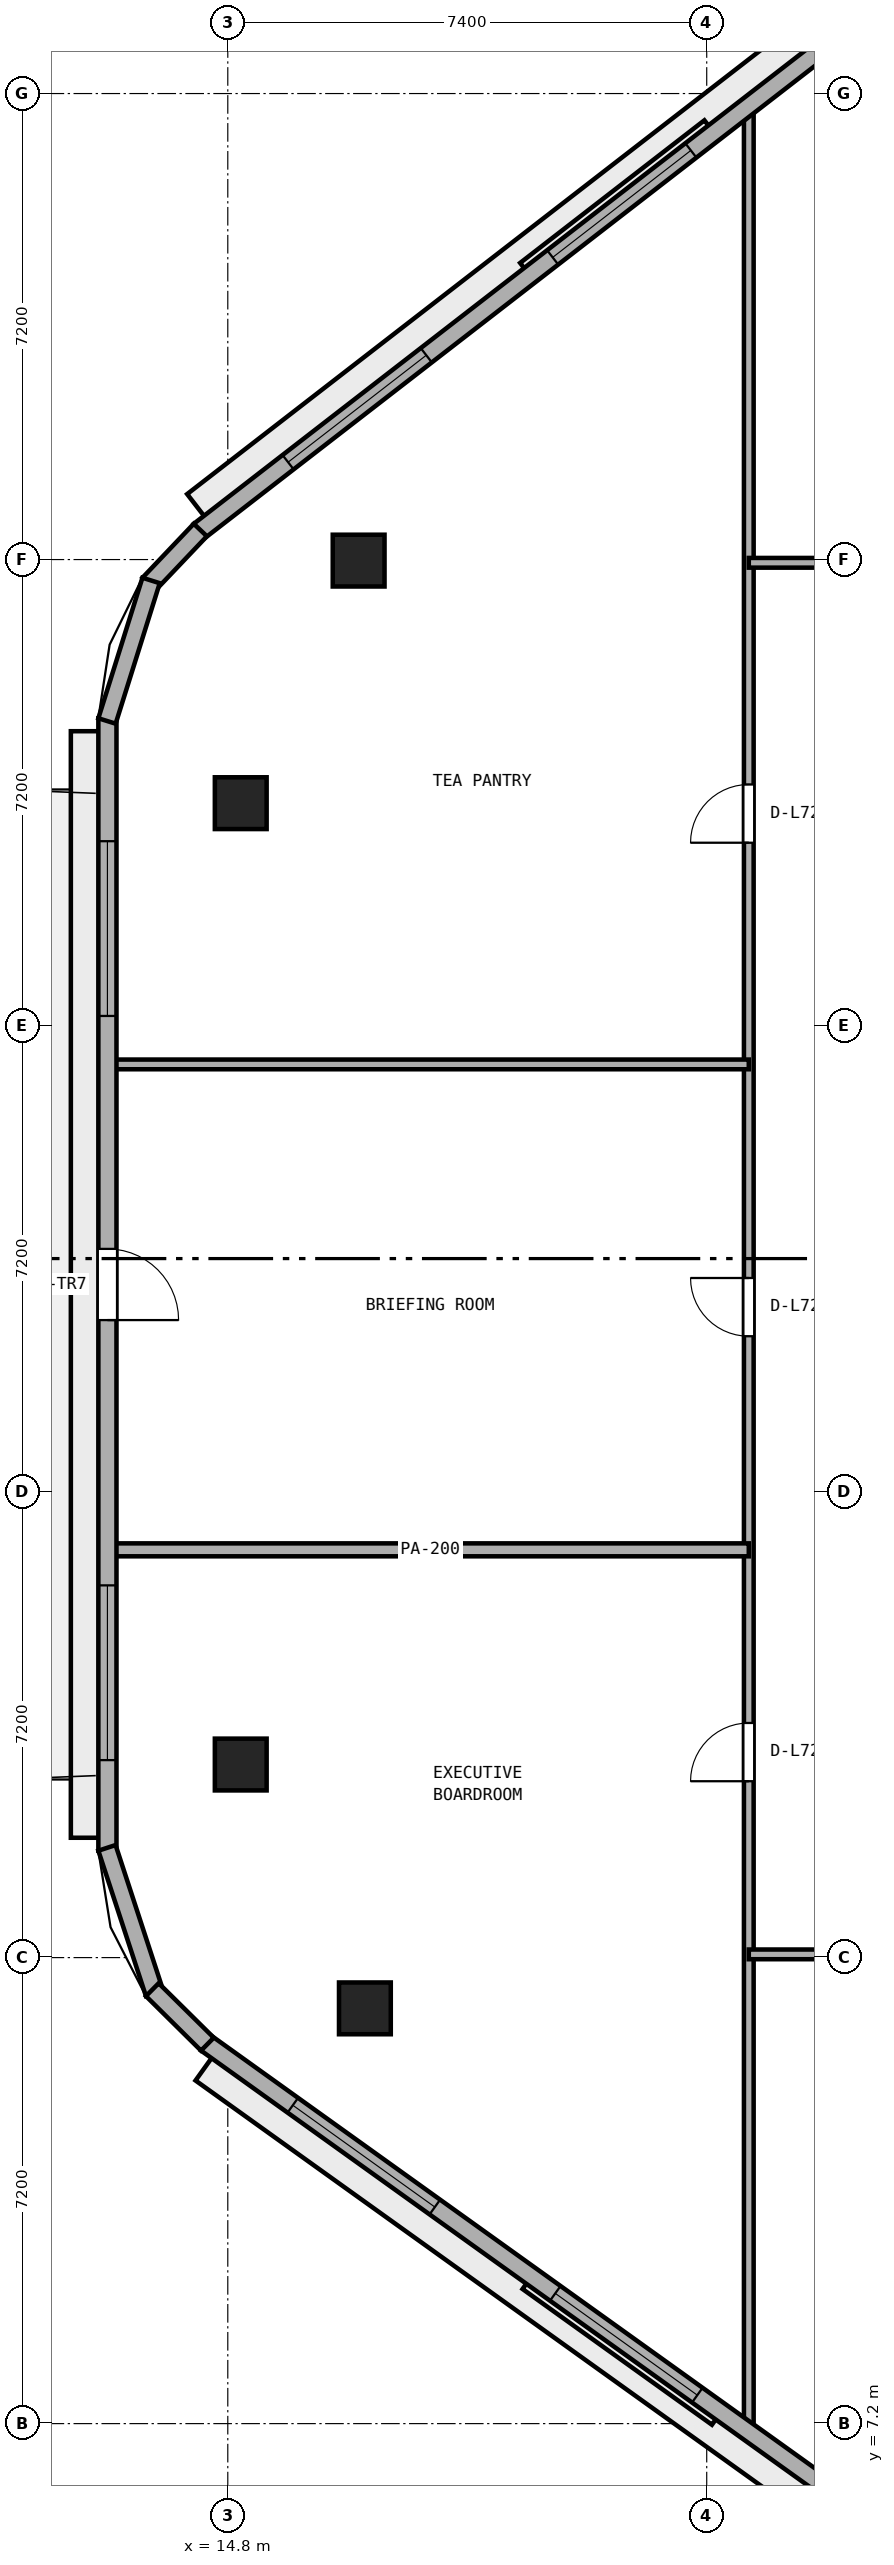
"""IFC4 building model, lengths in metres.
Left out: names, types, materials, properties, quantities, classifications, styles, units other than length and angle.
Written with IfcOpenShell. Run it as: python <this file> out.ifc"""

import sys

from ifc_helpers import new_model, si_unit, direction, frame, frame_2d, origin, origin_2d, place, context, subcontext, project, spatial, rectangle, extrude, element, fill, save


model = new_model("IFC4")
c1 = context("Model", 3, precision=1e-05, world=origin(), true_north=direction((0.0, 1.0)))
c2 = subcontext(c1, "Body", "Model", "MODEL_VIEW")
j1 = project(units=[si_unit("LENGTHUNIT", "METRE"), si_unit("PLANEANGLEUNIT", "RADIAN")], contexts=[c1])
p1 = place(None, origin())
s1 = spatial("IfcSite", under=j1, at=p1, CompositionType="ELEMENT")
p2 = place(p1, origin())
s2 = spatial("IfcBuilding", under=s1, at=p2, CompositionType="ELEMENT")
p3 = place(p2, frame((0.0, 0.0, 282.0)))
s3 = spatial("IfcBuildingStorey", under=s2, at=p3, CompositionType="ELEMENT", Elevation=282.0)
for number, where, z_axis, x_axis in (
    (1, (16.822, 35.984, 0.0), (0.0, 0.0, 1.0), (1.0, 0.0, 0.0)),
    (2, (15.0, 32.236, 0.0), (0.0, 0.0, 1.0), (1.0, 0.0, 0.0)),
    (3, (15.0, 17.383, 0.0), (0.0, 0.0, 1.0), (1.0, 0.0, 0.0)),
    (4, (16.918, 13.616, 0.0), (0.0, 0.0, 1.0), (1.0, 0.0, 0.0)),
):
    element("IfcColumn", number, at=place(p3, frame(where, z_axis=z_axis, x_axis=x_axis)), inside=s3, PredefinedType="COLUMN", context=c2, shape_type="SweptSolid", body=[
        extrude(rectangle(XDim=0.8, YDim=0.8, at=origin_2d()), origin(), (0.0, 0.0, 1.0), 3.8),
    ])
p4 = place(p3, frame((22.85, 7.037, 0.0), z_axis=(0.0, 0.0, 1.0), x_axis=(0.0, 1.0, 0.0)))
e5 = element("IfcWall", 5, at=p4, inside=s3, PredefinedType="PARTITIONING", context=c2, shape_type="SweptSolid", body=[
    extrude(rectangle(XDim=36.013, YDim=0.15, at=frame_2d((18.007, 0.0))), origin(), (0.0, 0.0, 1.0), 3.54),
])
p5 = place(p4, frame((10.088, 0.0, 0.0)))
e6 = element("IfcOpeningElement", 6, at=p5, cuts=e5, PredefinedType="OPENING", context=c2, shape_type="SweptSolid", body=[
    extrude(rectangle(XDim=0.9, YDim=2.1, at=frame_2d((0.45, 1.05))), frame((0.0, 0.085, 0.0), z_axis=(0.0, -1.0, 0.0), x_axis=(1.0, 0.0, 0.0)), (0.0, 0.0, 1.0), 0.17),
])
p6 = place(p4, frame((16.963, 0.0, 0.0)))
e7 = element("IfcOpeningElement", 7, at=p6, cuts=e5, PredefinedType="OPENING", context=c2, shape_type="SweptSolid", body=[
    extrude(rectangle(XDim=0.9, YDim=2.1, at=frame_2d((0.45, 1.05))), frame((0.0, 0.085, 0.0), z_axis=(0.0, -1.0, 0.0), x_axis=(1.0, 0.0, 0.0)), (0.0, 0.0, 1.0), 0.17),
])
p7 = place(p4, frame((24.588, 0.0, 0.0)))
e8 = element("IfcOpeningElement", 8, at=p7, cuts=e5, PredefinedType="OPENING", context=c2, shape_type="SweptSolid", body=[
    extrude(rectangle(XDim=0.9, YDim=2.1, at=frame_2d((0.45, 1.05))), frame((0.0, 0.085, 0.0), z_axis=(0.0, -1.0, 0.0), x_axis=(1.0, 0.0, 0.0)), (0.0, 0.0, 1.0), 0.17),
])
p8 = place(p3, frame((22.85, 14.45, 0.0), z_axis=(0.0, 0.0, 1.0), x_axis=(1.0, 0.0, 0.0)))
e9 = element("IfcWall", 9, at=p8, inside=s3, PredefinedType="PARTITIONING", context=c2, shape_type="SweptSolid", body=[
    extrude(rectangle(XDim=12.8, YDim=0.15, at=frame_2d((6.4, 0.0))), origin(), (0.0, 0.0, 1.0), 3.54),
])
p9 = place(p8, frame((5.9, 0.0, 0.0)))
e10 = element("IfcOpeningElement", 10, at=p9, cuts=e9, PredefinedType="OPENING", context=c2, shape_type="SweptSolid", body=[
    extrude(rectangle(XDim=1.0, YDim=2.12, at=frame_2d((0.5, 1.06))), frame((0.0, 0.085, 0.0), z_axis=(0.0, -1.0, 0.0), x_axis=(1.0, 0.0, 0.0)), (0.0, 0.0, 1.0), 0.17),
])
p10 = place(p3, frame((13.005, 20.7, 0.0), z_axis=(0.0, 0.0, 1.0), x_axis=(1.0, 0.0, 0.0)))
e11 = element("IfcWall", 11, at=p10, inside=s3, PredefinedType="PARTITIONING", context=c2, shape_type="SweptSolid", body=[
    extrude(rectangle(XDim=9.845, YDim=0.2, at=frame_2d((4.923, 0.0))), origin(), (0.0, 0.0, 1.0), 3.54),
])
p11 = place(p3, frame((13.005, 28.2, 0.0), z_axis=(0.0, 0.0, 1.0), x_axis=(1.0, 0.0, 0.0)))
e12 = element("IfcWall", 12, at=p11, inside=s3, PredefinedType="PARTITIONING", context=c2, shape_type="SweptSolid", body=[
    extrude(rectangle(XDim=9.845, YDim=0.15, at=frame_2d((4.923, 0.0))), origin(), (0.0, 0.0, 1.0), 3.54),
])
p12 = place(p3, frame((22.85, 35.95, 0.0), z_axis=(0.0, 0.0, 1.0), x_axis=(1.0, 0.0, 0.0)))
e13 = element("IfcWall", 13, at=p12, inside=s3, PredefinedType="PARTITIONING", context=c2, shape_type="SweptSolid", body=[
    extrude(rectangle(XDim=25.75, YDim=0.15, at=frame_2d((12.875, 0.0))), origin(), (0.0, 0.0, 1.0), 3.54),
])
p13 = place(p12, frame((3.395, 0.0, 0.0)))
e14 = element("IfcOpeningElement", 14, at=p13, cuts=e13, PredefinedType="OPENING", context=c2, shape_type="SweptSolid", body=[
    extrude(rectangle(XDim=1.0, YDim=2.12, at=frame_2d((0.5, 1.06))), frame((0.0, 0.085, 0.0), z_axis=(0.0, -1.0, 0.0), x_axis=(1.0, 0.0, 0.0)), (0.0, 0.0, 1.0), 0.17),
])
p14 = place(p12, frame((16.03, 0.0, 0.0)))
e15 = element("IfcOpeningElement", 15, at=p14, cuts=e13, PredefinedType="OPENING", context=c2, shape_type="SweptSolid", body=[
    extrude(rectangle(XDim=1.0, YDim=2.12, at=frame_2d((0.5, 1.06))), frame((0.0, 0.085, 0.0), z_axis=(0.0, -1.0, 0.0), x_axis=(1.0, 0.0, 0.0)), (0.0, 0.0, 1.0), 0.17),
])
p15 = place(p3, frame((27.415, 46.547, 0.0), z_axis=(0.0, 0.0, 1.0), x_axis=(-0.790789745248, -0.612087884875, 0.0)))
e16 = element("IfcWall", 16, at=p15, inside=s3, PredefinedType="STANDARD", context=c2, shape_type="SweptSolid", body=[
    extrude(rectangle(XDim=16.509, YDim=0.28, at=frame_2d((8.254, 0.0))), origin(), (0.0, 0.0, 1.0), 3.54),
])
p16 = place(p15, frame((1.735, 0.0, 0.9)))
e17 = element("IfcOpeningElement", 17, at=p16, cuts=e16, PredefinedType="OPENING", context=c2, shape_type="SweptSolid", body=[
    extrude(rectangle(XDim=2.7, YDim=1.75, at=frame_2d((1.35, 0.875))), frame((0.0, 0.15, 0.0), z_axis=(0.0, -1.0, 0.0), x_axis=(1.0, 0.0, 0.0)), (0.0, 0.0, 1.0), 0.3),
])
p17 = place(p15, frame((6.905, 0.0, 0.9)))
e18 = element("IfcOpeningElement", 18, at=p17, cuts=e16, PredefinedType="OPENING", context=c2, shape_type="SweptSolid", body=[
    extrude(rectangle(XDim=2.7, YDim=1.75, at=frame_2d((1.35, 0.875))), frame((0.0, 0.15, 0.0), z_axis=(0.0, -1.0, 0.0), x_axis=(1.0, 0.0, 0.0)), (0.0, 0.0, 1.0), 0.3),
])
p18 = place(p15, frame((12.074, 0.0, 0.9)))
e19 = element("IfcOpeningElement", 19, at=p18, cuts=e16, PredefinedType="OPENING", context=c2, shape_type="SweptSolid", body=[
    extrude(rectangle(XDim=2.7, YDim=1.75, at=frame_2d((1.35, 0.875))), frame((0.0, 0.15, 0.0), z_axis=(0.0, -1.0, 0.0), x_axis=(1.0, 0.0, 0.0)), (0.0, 0.0, 1.0), 0.3),
])
p19 = place(p3, frame((12.94, 33.548, 0.0), z_axis=(0.0, 0.0, 1.0), x_axis=(0.0, -1.0, 0.0)))
e20 = element("IfcWall", 20, at=p19, inside=s3, PredefinedType="STANDARD", context=c2, shape_type="SweptSolid", body=[
    extrude(rectangle(XDim=17.496, YDim=0.28, at=frame_2d((8.748, 0.0))), origin(), (0.0, 0.0, 1.0), 3.54),
])
p20 = place(p19, frame((8.198, 0.0, 0.0)))
e21 = element("IfcOpeningElement", 21, at=p20, cuts=e20, PredefinedType="OPENING", context=c2, shape_type="SweptSolid", body=[
    extrude(rectangle(XDim=1.1, YDim=2.2, at=frame_2d((0.55, 1.1))), frame((0.0, 0.15, 0.0), z_axis=(0.0, -1.0, 0.0), x_axis=(1.0, 0.0, 0.0)), (0.0, 0.0, 1.0), 0.3),
])
p21 = place(p19, frame((1.899, 0.0, 0.9)))
e22 = element("IfcOpeningElement", 22, at=p21, cuts=e20, PredefinedType="OPENING", context=c2, shape_type="SweptSolid", body=[
    extrude(rectangle(XDim=2.7, YDim=1.75, at=frame_2d((1.35, 0.875))), frame((0.0, 0.15, 0.0), z_axis=(0.0, -1.0, 0.0), x_axis=(1.0, 0.0, 0.0)), (0.0, 0.0, 1.0), 0.3),
])
p22 = place(p19, frame((13.397, 0.0, 0.9)))
e23 = element("IfcOpeningElement", 23, at=p22, cuts=e20, PredefinedType="OPENING", context=c2, shape_type="SweptSolid", body=[
    extrude(rectangle(XDim=2.7, YDim=1.75, at=frame_2d((1.35, 0.875))), frame((0.0, 0.15, 0.0), z_axis=(0.0, -1.0, 0.0), x_axis=(1.0, 0.0, 0.0)), (0.0, 0.0, 1.0), 0.3),
])
p23 = place(p3, frame((14.468, 13.077, 0.0), z_axis=(0.0, 0.0, 1.0), x_axis=(0.812809888039, -0.582529042972, 0.0)))
e24 = element("IfcWall", 24, at=p23, inside=s3, PredefinedType="STANDARD", context=c2, shape_type="SweptSolid", body=[
    extrude(rectangle(XDim=15.968, YDim=0.28, at=frame_2d((7.984, 0.0))), origin(), (0.0, 0.0, 1.0), 3.54),
])
p24 = place(p23, frame((1.645, 0.0, 0.9)))
e25 = element("IfcOpeningElement", 25, at=p24, cuts=e24, PredefinedType="OPENING", context=c2, shape_type="SweptSolid", body=[
    extrude(rectangle(XDim=2.7, YDim=1.75, at=frame_2d((1.35, 0.875))), frame((0.0, 0.15, 0.0), z_axis=(0.0, -1.0, 0.0), x_axis=(1.0, 0.0, 0.0)), (0.0, 0.0, 1.0), 0.3),
])
p25 = place(p23, frame((6.634, 0.0, 0.9)))
e26 = element("IfcOpeningElement", 26, at=p25, cuts=e24, PredefinedType="OPENING", context=c2, shape_type="SweptSolid", body=[
    extrude(rectangle(XDim=2.7, YDim=1.75, at=frame_2d((1.35, 0.875))), frame((0.0, 0.15, 0.0), z_axis=(0.0, -1.0, 0.0), x_axis=(1.0, 0.0, 0.0)), (0.0, 0.0, 1.0), 0.3),
])
p26 = place(p23, frame((11.623, 0.0, 0.9)))
e27 = element("IfcOpeningElement", 27, at=p26, cuts=e24, PredefinedType="OPENING", context=c2, shape_type="SweptSolid", body=[
    extrude(rectangle(XDim=2.7, YDim=1.75, at=frame_2d((1.35, 0.875))), frame((0.0, 0.15, 0.0), z_axis=(0.0, -1.0, 0.0), x_axis=(1.0, 0.0, 0.0)), (0.0, 0.0, 1.0), 0.3),
])
p27 = place(p3, frame((14.375, 36.457, 0.0), z_axis=(0.0, 0.0, 1.0), x_axis=(-0.68895569752, -0.724803453948, 0.0)))
e28 = element("IfcWall", 28, at=p27, inside=s3, PredefinedType="STANDARD", context=c2, shape_type="SweptSolid", body=[
    extrude(rectangle(XDim=1.151, YDim=0.28, at=frame_2d((0.575, 0.0))), origin(), (0.0, 0.0, 1.0), 3.54),
])
p28 = place(p3, frame((13.615, 35.677, 0.0), z_axis=(0.0, 0.0, 1.0), x_axis=(-0.299374552426, -0.954135670311, 0.0)))
e29 = element("IfcWall", 29, at=p28, inside=s3, PredefinedType="STANDARD", context=c2, shape_type="SweptSolid", body=[
    extrude(rectangle(XDim=2.275, YDim=0.28, at=frame_2d((1.138, 0.0))), origin(), (0.0, 0.0, 1.0), 3.54),
])
p29 = place(p3, frame((12.933, 16.095, 0.0), z_axis=(0.0, 0.0, 1.0), x_axis=(0.3110492363, -0.950393798695, 0.0)))
e30 = element("IfcWall", 30, at=p29, inside=s3, PredefinedType="STANDARD", context=c2, shape_type="SweptSolid", body=[
    extrude(rectangle(XDim=2.364, YDim=0.28, at=frame_2d((1.182, 0.0))), origin(), (0.0, 0.0, 1.0), 3.54),
])
p30 = place(p3, frame((13.634, 13.904, 0.0), z_axis=(0.0, 0.0, 1.0), x_axis=(0.710971221429, -0.703221104845, 0.0)))
e31 = element("IfcWall", 31, at=p30, inside=s3, PredefinedType="STANDARD", context=c2, shape_type="SweptSolid", body=[
    extrude(rectangle(XDim=1.197, YDim=0.28, at=frame_2d((0.599, 0.0))), origin(), (0.0, 0.0, 1.0), 3.54),
])
p31 = place(p5, origin())
e32 = element("IfcDoor", 32, at=p31, inside=s3, OperationType="SINGLE_SWING_LEFT", PredefinedType="DOOR", context=c2, shape_type="SweptSolid", body=[
    extrude(rectangle(XDim=0.9, YDim=2.1, at=frame_2d((0.45, 1.05))), frame((0.0, 0.025, 0.0), z_axis=(0.0, -1.0, 0.0), x_axis=(1.0, 0.0, 0.0)), (0.0, 0.0, 1.0), 0.05),
])
fill(e6, e32)
p32 = place(p6, origin())
e33 = element("IfcDoor", 33, at=p32, inside=s3, OperationType="SINGLE_SWING_RIGHT", PredefinedType="DOOR", context=c2, shape_type="SweptSolid", body=[
    extrude(rectangle(XDim=0.9, YDim=2.1, at=frame_2d((0.45, 1.05))), frame((0.0, 0.025, 0.0), z_axis=(0.0, -1.0, 0.0), x_axis=(1.0, 0.0, 0.0)), (0.0, 0.0, 1.0), 0.05),
])
fill(e7, e33)
p33 = place(p7, origin())
e34 = element("IfcDoor", 34, at=p33, inside=s3, OperationType="SINGLE_SWING_LEFT", PredefinedType="DOOR", context=c2, shape_type="SweptSolid", body=[
    extrude(rectangle(XDim=0.9, YDim=2.1, at=frame_2d((0.45, 1.05))), frame((0.0, 0.025, 0.0), z_axis=(0.0, -1.0, 0.0), x_axis=(1.0, 0.0, 0.0)), (0.0, 0.0, 1.0), 0.05),
])
fill(e8, e34)
p34 = place(p17, origin())
e35 = element("IfcWindow", 35, at=p34, inside=s3, PartitioningType="SINGLE_PANEL", PredefinedType="WINDOW", context=c2, shape_type="SweptSolid", body=[
    extrude(rectangle(XDim=2.7, YDim=1.75, at=frame_2d((1.35, 0.875))), frame((0.0, 0.03, 0.0), z_axis=(0.0, -1.0, 0.0), x_axis=(1.0, 0.0, 0.0)), (0.0, 0.0, 1.0), 0.06),
])
fill(e18, e35)
p35 = place(p18, origin())
e36 = element("IfcWindow", 36, at=p35, inside=s3, PartitioningType="SINGLE_PANEL", PredefinedType="WINDOW", context=c2, shape_type="SweptSolid", body=[
    extrude(rectangle(XDim=2.7, YDim=1.75, at=frame_2d((1.35, 0.875))), frame((0.0, 0.03, 0.0), z_axis=(0.0, -1.0, 0.0), x_axis=(1.0, 0.0, 0.0)), (0.0, 0.0, 1.0), 0.06),
])
fill(e19, e36)
p36 = place(p20, origin())
e37 = element("IfcDoor", 37, at=p36, inside=s3, OperationType="SINGLE_SWING_RIGHT", PredefinedType="DOOR", context=c2, shape_type="SweptSolid", body=[
    extrude(rectangle(XDim=1.1, YDim=2.2, at=frame_2d((0.55, 1.1))), frame((0.0, 0.025, 0.0), z_axis=(0.0, -1.0, 0.0), x_axis=(1.0, 0.0, 0.0)), (0.0, 0.0, 1.0), 0.05),
])
fill(e21, e37)
p37 = place(p21, origin())
e38 = element("IfcWindow", 38, at=p37, inside=s3, PartitioningType="SINGLE_PANEL", PredefinedType="WINDOW", context=c2, shape_type="SweptSolid", body=[
    extrude(rectangle(XDim=2.7, YDim=1.75, at=frame_2d((1.35, 0.875))), frame((0.0, 0.03, 0.0), z_axis=(0.0, -1.0, 0.0), x_axis=(1.0, 0.0, 0.0)), (0.0, 0.0, 1.0), 0.06),
])
fill(e22, e38)
p38 = place(p22, origin())
e39 = element("IfcWindow", 39, at=p38, inside=s3, PartitioningType="SINGLE_PANEL", PredefinedType="WINDOW", context=c2, shape_type="SweptSolid", body=[
    extrude(rectangle(XDim=2.7, YDim=1.75, at=frame_2d((1.35, 0.875))), frame((0.0, 0.03, 0.0), z_axis=(0.0, -1.0, 0.0), x_axis=(1.0, 0.0, 0.0)), (0.0, 0.0, 1.0), 0.06),
])
fill(e23, e39)
p39 = place(p24, origin())
e40 = element("IfcWindow", 40, at=p39, inside=s3, PartitioningType="SINGLE_PANEL", PredefinedType="WINDOW", context=c2, shape_type="SweptSolid", body=[
    extrude(rectangle(XDim=2.7, YDim=1.75, at=frame_2d((1.35, 0.875))), frame((0.0, 0.03, 0.0), z_axis=(0.0, -1.0, 0.0), x_axis=(1.0, 0.0, 0.0)), (0.0, 0.0, 1.0), 0.06),
])
fill(e25, e40)
p40 = place(p25, origin())
e41 = element("IfcWindow", 41, at=p40, inside=s3, PartitioningType="SINGLE_PANEL", PredefinedType="WINDOW", context=c2, shape_type="SweptSolid", body=[
    extrude(rectangle(XDim=2.7, YDim=1.75, at=frame_2d((1.35, 0.875))), frame((0.0, 0.03, 0.0), z_axis=(0.0, -1.0, 0.0), x_axis=(1.0, 0.0, 0.0)), (0.0, 0.0, 1.0), 0.06),
])
fill(e26, e41)
save(model, sys.argv[1])
